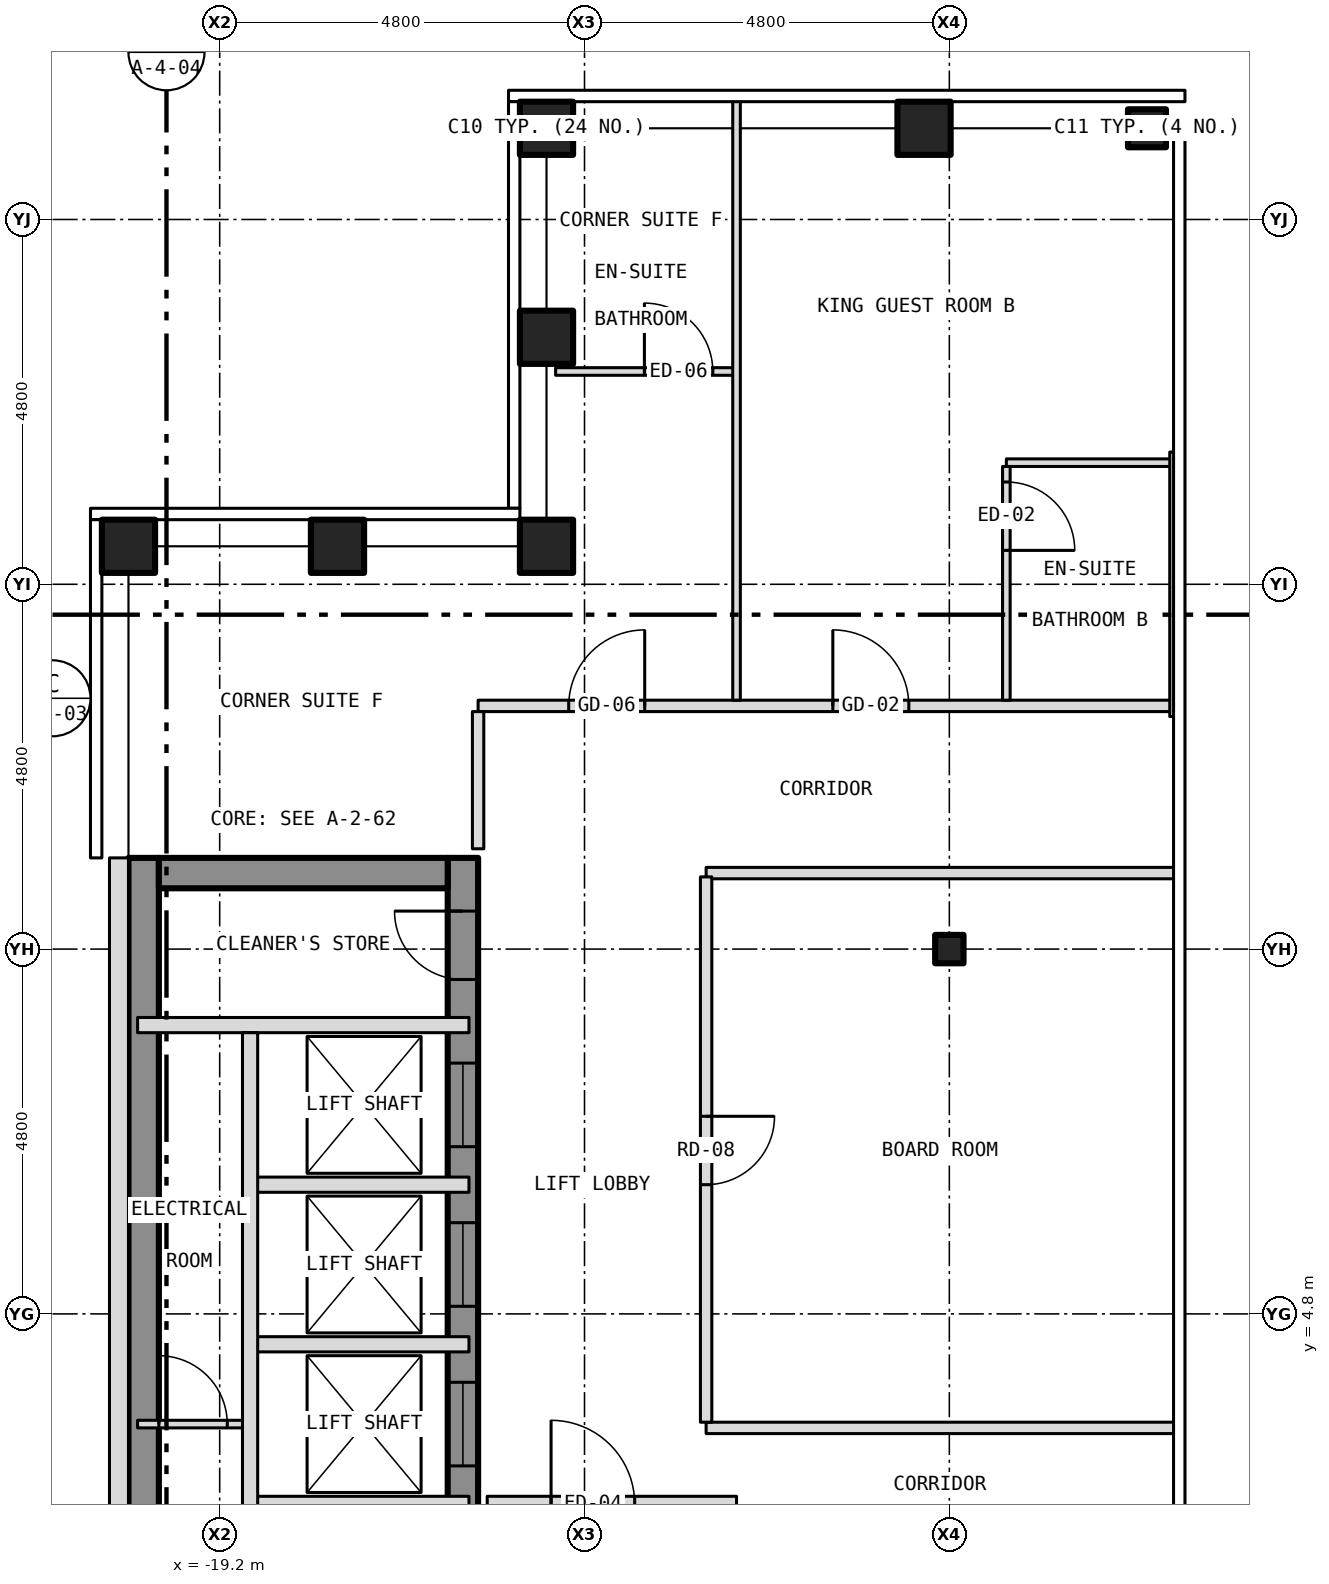
"""IFC4 building model, lengths in metres.
Left out: names, types, materials, properties, quantities, classifications, styles, units other than length and angle.
Written with IfcOpenShell. Run it as: python <this file> out.ifc"""

import sys

from ifc_helpers import new_model, si_unit, direction, frame, frame_2d, origin, origin_2d, place, context, subcontext, project, spatial, rectangle, hollow_rectangle, i_section, extrude, element, fill, save


model = new_model("IFC4")
c1 = context("Model", 3, precision=1e-05, world=origin(), true_north=direction((0.0, 1.0)))
c2 = subcontext(c1, "Body", "Model", "MODEL_VIEW")
j1 = project(units=[si_unit("LENGTHUNIT", "METRE"), si_unit("PLANEANGLEUNIT", "RADIAN")], contexts=[c1])
p1 = place(None, origin())
s1 = spatial("IfcSite", under=j1, at=p1, CompositionType="ELEMENT")
p2 = place(p1, origin())
s2 = spatial("IfcBuilding", under=s1, at=p2, CompositionType="ELEMENT")
p3 = place(p2, frame((0.0, 0.0, 226.0)))
s3 = spatial("IfcBuildingStorey", under=s2, at=p3, CompositionType="ELEMENT", Elevation=226.0)
for number, where, z_axis, x_axis in (
    (1, (-14.9, 20.4, -0.15), (0.0, 0.0, 1.0), (1.0, 0.0, 0.0)),
    (2, (-9.933, 20.4, -0.15), (0.0, 0.0, 1.0), (1.0, 0.0, 0.0)),
    (3, (-20.4, 14.9, -0.15), (0.0, 0.0, 1.0), (1.0, 0.0, 0.0)),
    (4, (-14.9, 14.9, -0.15), (0.0, 0.0, 1.0), (1.0, 0.0, 0.0)),
    (5, (-14.9, 17.65, -0.15), (0.0, 0.0, 1.0), (1.0, 0.0, 0.0)),
    (6, (-17.65, 14.9, -0.15), (0.0, 0.0, 1.0), (1.0, 0.0, 0.0)),
):
    element("IfcColumn", number, at=place(p3, frame(where, z_axis=z_axis, x_axis=x_axis)), inside=s3, PredefinedType="COLUMN", context=c2, shape_type="SweptSolid", body=[
        extrude(hollow_rectangle(XDim=0.7, YDim=0.7, WallThickness=0.04, at=origin_2d()), origin(), (0.0, 0.0, 1.0), 3.5),
    ])
p4 = place(p3, frame((-7.0, 20.4, -0.15), z_axis=(0.0, 0.0, 1.0), x_axis=(1.0, 0.0, 0.0)))
e7 = element("IfcColumn", 7, at=p4, inside=s3, PredefinedType="COLUMN", context=c2, shape_type="SweptSolid", body=[
    extrude(hollow_rectangle(XDim=0.5, YDim=0.5, WallThickness=0.03, at=origin_2d()), origin(), (0.0, 0.0, 1.0), 3.5),
])
p5 = place(p3, frame((-9.6, 9.6, -0.15), z_axis=(0.0, 0.0, 1.0), x_axis=(1.0, 0.0, 0.0)))
e8 = element("IfcColumn", 8, at=p5, inside=s3, PredefinedType="COLUMN", context=c2, shape_type="SweptSolid", body=[
    extrude(i_section(OverallWidth=0.373, OverallDepth=0.373, WebThickness=0.016, FlangeThickness=0.026, at=origin_2d()), origin(), (0.0, 0.0, 1.0), 3.5),
])
p6 = place(p3, frame((-16.0, -10.8, 0.0), z_axis=(0.0, 0.0, 1.0), x_axis=(0.0, 1.0, 0.0)))
e9 = element("IfcWall", 9, at=p6, inside=s3, PredefinedType="SHEAR", context=c2, shape_type="SweptSolid", body=[
    extrude(rectangle(XDim=21.6, YDim=0.4, at=frame_2d((10.8, 0.0))), origin(), (0.0, 0.0, 1.0), 3.25),
])
p7 = place(p6, frame((9.4, 0.0, 0.0)))
e10 = element("IfcOpeningElement", 10, at=p7, cuts=e9, PredefinedType="OPENING", context=c2, shape_type="SweptSolid", body=[
    extrude(rectangle(XDim=1.1, YDim=2.1, at=frame_2d((0.55, 1.05))), frame((0.0, 0.212, 0.0), z_axis=(0.0, -1.0, 0.0), x_axis=(1.0, 0.0, 0.0)), (0.0, 0.0, 1.0), 0.424),
])
p8 = place(p6, frame((11.5, 0.0, 0.0)))
e11 = element("IfcOpeningElement", 11, at=p8, cuts=e9, PredefinedType="OPENING", context=c2, shape_type="SweptSolid", body=[
    extrude(rectangle(XDim=1.1, YDim=2.1, at=frame_2d((0.55, 1.05))), frame((0.0, 0.212, 0.0), z_axis=(0.0, -1.0, 0.0), x_axis=(1.0, 0.0, 0.0)), (0.0, 0.0, 1.0), 0.424),
])
p9 = place(p6, frame((13.6, 0.0, 0.0)))
e12 = element("IfcOpeningElement", 12, at=p9, cuts=e9, PredefinedType="OPENING", context=c2, shape_type="SweptSolid", body=[
    extrude(rectangle(XDim=1.1, YDim=2.1, at=frame_2d((0.55, 1.05))), frame((0.0, 0.212, 0.0), z_axis=(0.0, -1.0, 0.0), x_axis=(1.0, 0.0, 0.0)), (0.0, 0.0, 1.0), 0.424),
])
p10 = place(p6, frame((15.7, 0.0, 0.0)))
e13 = element("IfcOpeningElement", 13, at=p10, cuts=e9, PredefinedType="OPENING", context=c2, shape_type="SweptSolid", body=[
    extrude(rectangle(XDim=1.1, YDim=2.1, at=frame_2d((0.55, 1.05))), frame((0.0, 0.212, 0.0), z_axis=(0.0, -1.0, 0.0), x_axis=(1.0, 0.0, 0.0)), (0.0, 0.0, 1.0), 0.424),
])
p11 = place(p6, frame((17.8, 0.0, 0.0)))
e14 = element("IfcOpeningElement", 14, at=p11, cuts=e9, PredefinedType="OPENING", context=c2, shape_type="SweptSolid", body=[
    extrude(rectangle(XDim=1.1, YDim=2.1, at=frame_2d((0.55, 1.05))), frame((0.0, 0.212, 0.0), z_axis=(0.0, -1.0, 0.0), x_axis=(1.0, 0.0, 0.0)), (0.0, 0.0, 1.0), 0.424),
])
p12 = place(p6, frame((0.458, 0.0, 0.0)))
e15 = element("IfcOpeningElement", 15, at=p12, cuts=e9, PredefinedType="OPENING", context=c2, shape_type="SweptSolid", body=[
    extrude(rectangle(XDim=1.1, YDim=2.1, at=frame_2d((0.55, 1.05))), frame((0.0, 0.212, 0.0), z_axis=(0.0, -1.0, 0.0), x_axis=(1.0, 0.0, 0.0)), (0.0, 0.0, 1.0), 0.424),
])
p13 = place(p6, frame((7.5, 0.0, 0.0)))
e16 = element("IfcOpeningElement", 16, at=p13, cuts=e9, PredefinedType="OPENING", context=c2, shape_type="SweptSolid", body=[
    extrude(rectangle(XDim=1.1, YDim=2.1, at=frame_2d((0.55, 1.05))), frame((0.0, 0.212, 0.0), z_axis=(0.0, -1.0, 0.0), x_axis=(1.0, 0.0, 0.0)), (0.0, 0.0, 1.0), 0.424),
])
p14 = place(p6, frame((20.0, 0.0, 0.0)))
e17 = element("IfcOpeningElement", 17, at=p14, cuts=e9, PredefinedType="OPENING", context=c2, shape_type="SweptSolid", body=[
    extrude(rectangle(XDim=0.9, YDim=2.1, at=frame_2d((0.45, 1.05))), frame((0.0, 0.212, 0.0), z_axis=(0.0, -1.0, 0.0), x_axis=(1.0, 0.0, 0.0)), (0.0, 0.0, 1.0), 0.424),
])
p15 = place(p3, frame((-20.2, -10.8, 0.0), z_axis=(0.0, 0.0, 1.0), x_axis=(0.0, 1.0, 0.0)))
e18 = element("IfcWall", 18, at=p15, inside=s3, PredefinedType="SHEAR", context=c2, shape_type="SweptSolid", body=[
    extrude(rectangle(XDim=21.6, YDim=0.4, at=frame_2d((10.8, 0.0))), origin(), (0.0, 0.0, 1.0), 3.25),
])
p16 = place(p3, frame((-20.0, 10.6, 0.0), z_axis=(0.0, 0.0, 1.0), x_axis=(1.0, 0.0, 0.0)))
e19 = element("IfcWall", 19, at=p16, inside=s3, PredefinedType="SHEAR", context=c2, shape_type="SweptSolid", body=[
    extrude(rectangle(XDim=3.8, YDim=0.4, at=frame_2d((1.9, 0.0))), origin(), (0.0, 0.0, 1.0), 3.25),
])
p17 = place(p3, frame((-20.525, 10.8, 0.0), z_axis=(0.0, 0.0, 1.0), x_axis=(0.0, -1.0, 0.0)))
e20 = element("IfcWall", 20, at=p17, inside=s3, PredefinedType="SOLIDWALL", context=c2, shape_type="SweptSolid", body=[
    extrude(rectangle(XDim=21.6, YDim=0.25, at=frame_2d((10.8, 0.0))), origin(), (0.0, 0.0, 1.0), 3.5),
])
p18 = place(p17, frame((18.05, 0.0, 1.0)))
e21 = element("IfcOpeningElement", 21, at=p18, cuts=e20, PredefinedType="OPENING", context=c2, shape_type="SweptSolid", body=[
    extrude(rectangle(XDim=0.6, YDim=1.5, at=frame_2d((0.3, 0.75))), frame((0.0, 0.137, 0.0), z_axis=(0.0, -1.0, 0.0), x_axis=(1.0, 0.0, 0.0)), (0.0, 0.0, 1.0), 0.274),
])
p19 = place(p3, frame((-18.8, 2.3, 0.0), z_axis=(0.0, 0.0, 1.0), x_axis=(1.0, 0.0, 0.0)))
e22 = element("IfcWall", 22, at=p19, inside=s3, PredefinedType="PARTITIONING", context=c2, shape_type="SweptSolid", body=[
    extrude(rectangle(XDim=2.88, YDim=0.2, at=frame_2d((1.44, 0.0))), origin(), (0.0, 0.0, 1.0), 3.25),
])
p20 = place(p3, frame((-15.68, 2.3, 0.0), z_axis=(0.0, 0.0, 1.0), x_axis=(1.0, 0.0, 0.0)))
e23 = element("IfcWall", 23, at=p20, inside=s3, PredefinedType="PARTITIONING", context=c2, shape_type="SweptSolid", body=[
    extrude(rectangle(XDim=3.28, YDim=0.2, at=frame_2d((1.64, 0.0))), origin(), (0.0, 0.0, 1.0), 3.35),
])
p21 = place(p20, frame((0.84, 0.0, 0.0)))
e24 = element("IfcOpeningElement", 24, at=p21, cuts=e23, PredefinedType="OPENING", context=c2, shape_type="SweptSolid", body=[
    extrude(rectangle(XDim=1.1, YDim=2.1, at=frame_2d((0.55, 1.05))), frame((0.0, 0.112, 0.0), z_axis=(0.0, -1.0, 0.0), x_axis=(1.0, 0.0, 0.0)), (0.0, 0.0, 1.0), 0.224),
])
p22 = place(p3, frame((-12.8, 3.3, 0.0), z_axis=(0.0, 0.0, 1.0), x_axis=(1.0, 0.0, 0.0)))
e25 = element("IfcWall", 25, at=p22, inside=s3, PredefinedType="PARTITIONING", context=c2, shape_type="SweptSolid", body=[
    extrude(rectangle(XDim=6.18, YDim=0.15, at=frame_2d((3.09, 0.0))), origin(), (0.0, 0.0, 1.0), 3.35),
])
p23 = place(p3, frame((-20.28, 3.35, 0.0), z_axis=(0.0, 0.0, 1.0), x_axis=(1.0, 0.0, 0.0)))
e26 = element("IfcWall", 26, at=p23, inside=s3, PredefinedType="PARTITIONING", context=c2, shape_type="SweptSolid", body=[
    extrude(rectangle(XDim=1.48, YDim=0.1, at=frame_2d((0.74, 0.0))), origin(), (0.0, 0.0, 1.0), 3.25),
])
p24 = place(p23, frame((0.28, 0.0, 0.0)))
e27 = element("IfcOpeningElement", 27, at=p24, cuts=e26, PredefinedType="OPENING", context=c2, shape_type="SweptSolid", body=[
    extrude(rectangle(XDim=0.9, YDim=2.1, at=frame_2d((0.45, 1.05))), frame((0.0, 0.062, 0.0), z_axis=(0.0, -1.0, 0.0), x_axis=(1.0, 0.0, 0.0)), (0.0, 0.0, 1.0), 0.124),
])
for number, where, z_axis, x_axis in (
    (28, (-18.8, 4.4, 0.0), (0.0, 0.0, 1.0), (1.0, 0.0, 0.0)),
    (29, (-18.8, 6.5, 0.0), (0.0, 0.0, 1.0), (1.0, 0.0, 0.0)),
):
    element("IfcWall", number, at=place(p3, frame(where, z_axis=z_axis, x_axis=x_axis)), inside=s3, PredefinedType="PARTITIONING", context=c2, shape_type="SweptSolid", body=[
        extrude(rectangle(XDim=2.88, YDim=0.2, at=frame_2d((1.44, 0.0))), origin(), (0.0, 0.0, 1.0), 3.25),
    ])
p25 = place(p3, frame((-20.28, 8.6, 0.0), z_axis=(0.0, 0.0, 1.0), x_axis=(1.0, 0.0, 0.0)))
e30 = element("IfcWall", 30, at=p25, inside=s3, PredefinedType="PARTITIONING", context=c2, shape_type="SweptSolid", body=[
    extrude(rectangle(XDim=4.36, YDim=0.2, at=frame_2d((2.18, 0.0))), origin(), (0.0, 0.0, 1.0), 3.25),
])
p26 = place(p3, frame((-12.8, 10.6, 0.0), z_axis=(0.0, 0.0, 1.0), x_axis=(1.0, 0.0, 0.0)))
e31 = element("IfcWall", 31, at=p26, inside=s3, PredefinedType="PARTITIONING", context=c2, shape_type="SweptSolid", body=[
    extrude(rectangle(XDim=6.18, YDim=0.15, at=frame_2d((3.09, 0.0))), origin(), (0.0, 0.0, 1.0), 3.35),
])
p27 = place(p3, frame((-15.8, 12.8, 0.0), z_axis=(0.0, 0.0, 1.0), x_axis=(1.0, 0.0, 0.0)))
e32 = element("IfcWall", 32, at=p27, inside=s3, PredefinedType="PARTITIONING", context=c2, shape_type="SweptSolid", body=[
    extrude(rectangle(XDim=9.15, YDim=0.15, at=frame_2d((4.575, 0.0))), origin(), (0.0, 0.0, 1.0), 3.35),
])
p28 = place(p27, frame((4.667, 0.0, 0.0)))
e33 = element("IfcOpeningElement", 33, at=p28, cuts=e32, PredefinedType="OPENING", context=c2, shape_type="SweptSolid", body=[
    extrude(rectangle(XDim=1.0, YDim=2.1, at=frame_2d((0.5, 1.05))), frame((0.0, 0.087, 0.0), z_axis=(0.0, -1.0, 0.0), x_axis=(1.0, 0.0, 0.0)), (0.0, 0.0, 1.0), 0.174),
])
p29 = place(p27, frame((1.192, 0.0, 0.0)))
e34 = element("IfcOpeningElement", 34, at=p29, cuts=e32, PredefinedType="OPENING", context=c2, shape_type="SweptSolid", body=[
    extrude(rectangle(XDim=1.0, YDim=2.1, at=frame_2d((0.5, 1.05))), frame((0.0, 0.087, 0.0), z_axis=(0.0, -1.0, 0.0), x_axis=(1.0, 0.0, 0.0)), (0.0, 0.0, 1.0), 0.174),
])
p30 = place(p3, frame((-8.85, 16.0, 0.0), z_axis=(0.0, 0.0, 1.0), x_axis=(1.0, 0.0, 0.0)))
e35 = element("IfcWall", 35, at=p30, inside=s3, PredefinedType="PARTITIONING", context=c2, shape_type="SweptSolid", body=[
    extrude(rectangle(XDim=2.2, YDim=0.1, at=frame_2d((1.1, 0.0))), origin(), (0.0, 0.0, 1.0), 3.35),
])
p31 = place(p3, frame((-14.78, 17.2, 0.0), z_axis=(0.0, 0.0, 1.0), x_axis=(1.0, 0.0, 0.0)))
e36 = element("IfcWall", 36, at=p31, inside=s3, PredefinedType="PARTITIONING", context=c2, shape_type="SweptSolid", body=[
    extrude(rectangle(XDim=2.38, YDim=0.1, at=frame_2d((1.19, 0.0))), origin(), (0.0, 0.0, 1.0), 3.35),
])
p32 = place(p31, frame((1.168, 0.0, 0.0)))
e37 = element("IfcOpeningElement", 37, at=p32, cuts=e36, PredefinedType="OPENING", context=c2, shape_type="SweptSolid", body=[
    extrude(rectangle(XDim=0.9, YDim=2.1, at=frame_2d((0.45, 1.05))), frame((0.0, 0.062, 0.0), z_axis=(0.0, -1.0, 0.0), x_axis=(1.0, 0.0, 0.0)), (0.0, 0.0, 1.0), 0.124),
])
p33 = place(p3, frame((-18.8, -1.8, 0.0), z_axis=(0.0, 0.0, 1.0), x_axis=(0.0, 1.0, 0.0)))
e38 = element("IfcWall", 38, at=p33, inside=s3, PredefinedType="PARTITIONING", context=c2, shape_type="SweptSolid", body=[
    extrude(rectangle(XDim=10.3, YDim=0.2, at=frame_2d((5.15, 0.0))), origin(), (0.0, 0.0, 1.0), 3.25),
])
p34 = place(p3, frame((-15.8, 10.92, 0.0), z_axis=(0.0, 0.0, 1.0), x_axis=(0.0, 1.0, 0.0)))
e39 = element("IfcWall", 39, at=p34, inside=s3, PredefinedType="PARTITIONING", context=c2, shape_type="SweptSolid", body=[
    extrude(rectangle(XDim=1.805, YDim=0.15, at=frame_2d((0.903, 0.0))), origin(), (0.0, 0.0, 1.0), 3.35),
])
p35 = place(p3, frame((-12.8, 3.375, 0.0), z_axis=(0.0, 0.0, 1.0), x_axis=(0.0, 1.0, 0.0)))
e40 = element("IfcWall", 40, at=p35, inside=s3, PredefinedType="PARTITIONING", context=c2, shape_type="SweptSolid", body=[
    extrude(rectangle(XDim=7.175, YDim=0.15, at=frame_2d((3.587, 0.0))), origin(), (0.0, 0.0, 1.0), 3.35),
])
p36 = place(p35, frame((3.125, 0.0, 0.0)))
e41 = element("IfcOpeningElement", 41, at=p36, cuts=e40, PredefinedType="OPENING", context=c2, shape_type="SweptSolid", body=[
    extrude(rectangle(XDim=0.9, YDim=2.1, at=frame_2d((0.45, 1.05))), frame((0.0, 0.087, 0.0), z_axis=(0.0, -1.0, 0.0), x_axis=(1.0, 0.0, 0.0)), (0.0, 0.0, 1.0), 0.174),
])
p37 = place(p3, frame((-12.4, 12.875, 0.0), z_axis=(0.0, 0.0, 1.0), x_axis=(0.0, 1.0, 0.0)))
e42 = element("IfcWall", 42, at=p37, inside=s3, PredefinedType="PARTITIONING", context=c2, shape_type="SweptSolid", body=[
    extrude(rectangle(XDim=7.905, YDim=0.1, at=frame_2d((3.953, 0.0))), origin(), (0.0, 0.0, 1.0), 3.35),
])
p38 = place(p3, frame((-8.85, 12.875, 0.0), z_axis=(0.0, 0.0, 1.0), x_axis=(0.0, 1.0, 0.0)))
e43 = element("IfcWall", 43, at=p38, inside=s3, PredefinedType="PARTITIONING", context=c2, shape_type="SweptSolid", body=[
    extrude(rectangle(XDim=3.075, YDim=0.1, at=frame_2d((1.538, 0.0))), origin(), (0.0, 0.0, 1.0), 3.35),
])
p39 = place(p38, frame((1.971, 0.0, 0.0)))
e44 = element("IfcOpeningElement", 44, at=p39, cuts=e43, PredefinedType="OPENING", context=c2, shape_type="SweptSolid", body=[
    extrude(rectangle(XDim=0.9, YDim=2.1, at=frame_2d((0.45, 1.05))), frame((0.0, 0.062, 0.0), z_axis=(0.0, -1.0, 0.0), x_axis=(1.0, 0.0, 0.0)), (0.0, 0.0, 1.0), 0.124),
])
p40 = place(p3, frame((-6.65, 12.66, 0.0), z_axis=(0.0, 0.0, 1.0), x_axis=(0.0, 1.0, 0.0)))
e45 = element("IfcWall", 45, at=p40, inside=s3, PredefinedType="PARTITIONING", context=c2, shape_type="SweptSolid", body=[
    extrude(rectangle(XDim=3.48, YDim=0.1, at=frame_2d((1.74, 0.0))), origin(), (0.0, 0.0, 1.0), 3.35),
])
p41 = place(p9, origin())
e46 = element("IfcDoor", 46, at=p41, inside=s3, OperationType="SLIDING_TO_LEFT", PredefinedType="DOOR", context=c2, shape_type="SweptSolid", body=[
    extrude(rectangle(XDim=1.1, YDim=2.1, at=frame_2d((0.55, 1.05))), frame((0.0, 0.025, 0.0), z_axis=(0.0, -1.0, 0.0), x_axis=(1.0, 0.0, 0.0)), (0.0, 0.0, 1.0), 0.05),
])
fill(e12, e46)
p42 = place(p10, origin())
e47 = element("IfcDoor", 47, at=p42, inside=s3, OperationType="SLIDING_TO_LEFT", PredefinedType="DOOR", context=c2, shape_type="SweptSolid", body=[
    extrude(rectangle(XDim=1.1, YDim=2.1, at=frame_2d((0.55, 1.05))), frame((0.0, 0.025, 0.0), z_axis=(0.0, -1.0, 0.0), x_axis=(1.0, 0.0, 0.0)), (0.0, 0.0, 1.0), 0.05),
])
fill(e13, e47)
p43 = place(p11, origin())
e48 = element("IfcDoor", 48, at=p43, inside=s3, OperationType="SLIDING_TO_LEFT", PredefinedType="DOOR", context=c2, shape_type="SweptSolid", body=[
    extrude(rectangle(XDim=1.1, YDim=2.1, at=frame_2d((0.55, 1.05))), frame((0.0, 0.025, 0.0), z_axis=(0.0, -1.0, 0.0), x_axis=(1.0, 0.0, 0.0)), (0.0, 0.0, 1.0), 0.05),
])
fill(e14, e48)
p44 = place(p14, origin())
e49 = element("IfcDoor", 49, at=p44, inside=s3, OperationType="SINGLE_SWING_RIGHT", PredefinedType="DOOR", context=c2, shape_type="SweptSolid", body=[
    extrude(rectangle(XDim=0.9, YDim=2.1, at=frame_2d((0.45, 1.05))), frame((0.0, 0.025, 0.0), z_axis=(0.0, -1.0, 0.0), x_axis=(1.0, 0.0, 0.0)), (0.0, 0.0, 1.0), 0.05),
])
fill(e17, e49)
p45 = place(p24, origin())
e50 = element("IfcDoor", 50, at=p45, inside=s3, OperationType="SINGLE_SWING_LEFT", PredefinedType="DOOR", context=c2, shape_type="SweptSolid", body=[
    extrude(rectangle(XDim=0.9, YDim=2.1, at=frame_2d((0.45, 1.05))), frame((0.0, 0.025, 0.0), z_axis=(0.0, -1.0, 0.0), x_axis=(1.0, 0.0, 0.0)), (0.0, 0.0, 1.0), 0.05),
])
fill(e27, e50)
p46 = place(p21, origin())
e51 = element("IfcDoor", 51, at=p46, inside=s3, OperationType="SINGLE_SWING_LEFT", PredefinedType="DOOR", context=c2, shape_type="SweptSolid", body=[
    extrude(rectangle(XDim=1.1, YDim=2.1, at=frame_2d((0.55, 1.05))), frame((0.0, 0.025, 0.0), z_axis=(0.0, -1.0, 0.0), x_axis=(1.0, 0.0, 0.0)), (0.0, 0.0, 1.0), 0.05),
])
fill(e24, e51)
p47 = place(p28, origin())
e52 = element("IfcDoor", 52, at=p47, inside=s3, OperationType="SINGLE_SWING_LEFT", PredefinedType="DOOR", context=c2, shape_type="SweptSolid", body=[
    extrude(rectangle(XDim=1.0, YDim=2.1, at=frame_2d((0.5, 1.05))), frame((0.0, 0.025, 0.0), z_axis=(0.0, -1.0, 0.0), x_axis=(1.0, 0.0, 0.0)), (0.0, 0.0, 1.0), 0.05),
])
fill(e33, e52)
p48 = place(p39, origin())
e53 = element("IfcDoor", 53, at=p48, inside=s3, OperationType="SINGLE_SWING_LEFT", PredefinedType="DOOR", context=c2, shape_type="SweptSolid", body=[
    extrude(rectangle(XDim=0.9, YDim=2.1, at=frame_2d((0.45, 1.05))), frame((0.0, 0.025, 0.0), z_axis=(0.0, -1.0, 0.0), x_axis=(1.0, 0.0, 0.0)), (0.0, 0.0, 1.0), 0.05),
])
fill(e44, e53)
p49 = place(p32, origin())
e54 = element("IfcDoor", 54, at=p49, inside=s3, OperationType="SINGLE_SWING_LEFT", PredefinedType="DOOR", context=c2, shape_type="SweptSolid", body=[
    extrude(rectangle(XDim=0.9, YDim=2.1, at=frame_2d((0.45, 1.05))), frame((0.0, 0.025, 0.0), z_axis=(0.0, -1.0, 0.0), x_axis=(1.0, 0.0, 0.0)), (0.0, 0.0, 1.0), 0.05),
])
fill(e37, e54)
p50 = place(p29, origin())
e55 = element("IfcDoor", 55, at=p50, inside=s3, OperationType="SINGLE_SWING_RIGHT", PredefinedType="DOOR", context=c2, shape_type="SweptSolid", body=[
    extrude(rectangle(XDim=1.0, YDim=2.1, at=frame_2d((0.5, 1.05))), frame((0.0, 0.025, 0.0), z_axis=(0.0, -1.0, 0.0), x_axis=(1.0, 0.0, 0.0)), (0.0, 0.0, 1.0), 0.05),
])
fill(e34, e55)
p51 = place(p36, origin())
e56 = element("IfcDoor", 56, at=p51, inside=s3, OperationType="SINGLE_SWING_RIGHT", PredefinedType="DOOR", context=c2, shape_type="SweptSolid", body=[
    extrude(rectangle(XDim=0.9, YDim=2.1, at=frame_2d((0.45, 1.05))), frame((0.0, 0.025, 0.0), z_axis=(0.0, -1.0, 0.0), x_axis=(1.0, 0.0, 0.0)), (0.0, 0.0, 1.0), 0.05),
])
fill(e41, e56)
save(model, sys.argv[1])
